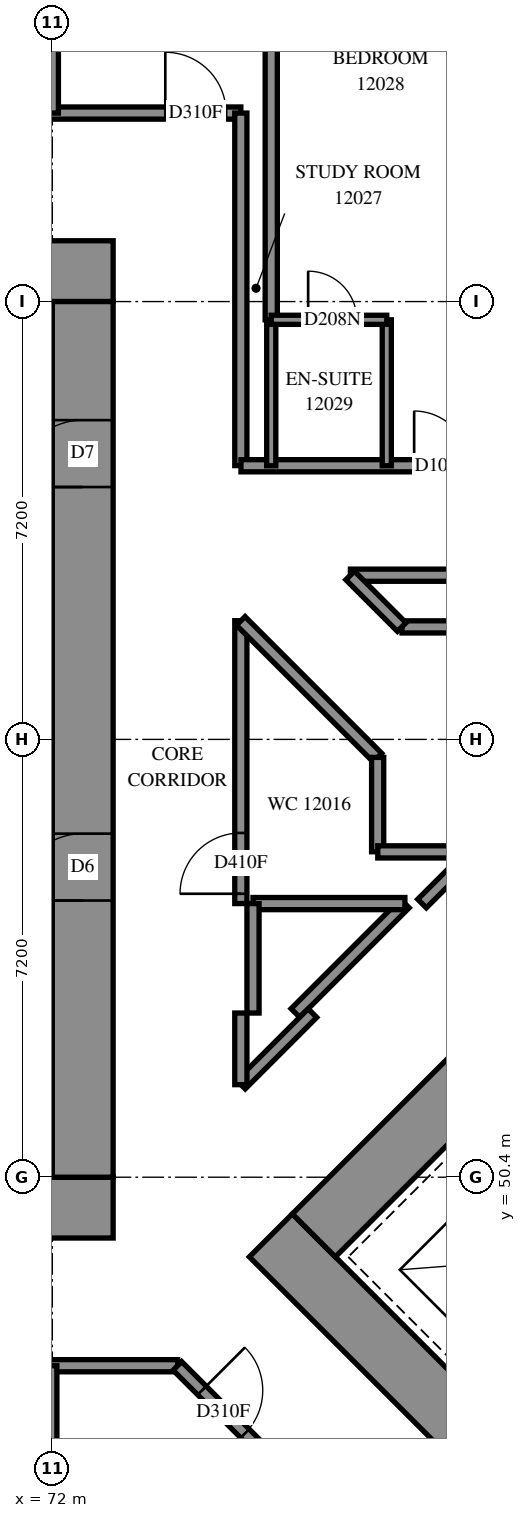
"""IFC4 building model, lengths in metres.
Left out: names, types, materials, properties, quantities, classifications, styles, units other than length and angle.
Written with IfcOpenShell. Run it as: python <this file> out.ifc"""

import sys

from ifc_helpers import new_model, si_unit, direction, frame, frame_2d, origin, place, context, subcontext, project, spatial, rectangle, extrude, element, fill, save


model = new_model("IFC4")
c1 = context("Model", 3, precision=1e-05, world=origin(), true_north=direction((0.0, 1.0)))
c2 = subcontext(c1, "Body", "Model", "MODEL_VIEW")
j1 = project(units=[si_unit("LENGTHUNIT", "METRE"), si_unit("PLANEANGLEUNIT", "RADIAN")], contexts=[c1])
p1 = place(None, origin())
s1 = spatial("IfcSite", under=j1, at=p1, CompositionType="ELEMENT")
p2 = place(p1, origin())
s2 = spatial("IfcBuilding", under=s1, at=p2, CompositionType="ELEMENT")
p3 = place(p2, frame((0.0, 0.0, 47.4)))
s3 = spatial("IfcBuildingStorey", under=s2, at=p3, CompositionType="ELEMENT", Elevation=47.4)
p4 = place(p3, frame((56.6, 49.9, -0.3), z_axis=(0.0, 0.0, 1.0), x_axis=(1.0, 0.0, 0.0)))
e1 = element("IfcWall", 1, at=p4, inside=s3, PredefinedType="SHEAR", context=c2, shape_type="SweptSolid", body=[
    extrude(rectangle(XDim=16.4, YDim=1.0, at=frame_2d((8.2, 0.0))), origin(), (0.0, 0.0, 1.0), 2.7),
])
p5 = place(p3, frame((56.6, 65.3, -0.3), z_axis=(0.0, 0.0, 1.0), x_axis=(1.0, 0.0, 0.0)))
e2 = element("IfcWall", 2, at=p5, inside=s3, PredefinedType="SHEAR", context=c2, shape_type="SweptSolid", body=[
    extrude(rectangle(XDim=16.4, YDim=1.0, at=frame_2d((8.2, 0.0))), origin(), (0.0, 0.0, 1.0), 2.7),
])
p6 = place(p5, frame((11.0, 0.0, 0.3)))
e3 = element("IfcOpeningElement", 3, at=p6, cuts=e2, PredefinedType="OPENING", context=c2, shape_type="SweptSolid", body=[
    extrude(rectangle(XDim=0.8, YDim=2.1, at=frame_2d((0.4, 1.05))), frame((0.0, 0.51, 0.0), z_axis=(0.0, -1.0, 0.0), x_axis=(1.0, 0.0, 0.0)), (0.0, 0.0, 1.0), 1.02),
])
p7 = place(p3, frame((72.5, 50.4, -0.3), z_axis=(0.0, 0.0, 1.0), x_axis=(0.0, 1.0, 0.0)))
e4 = element("IfcWall", 4, at=p7, inside=s3, PredefinedType="SHEAR", context=c2, shape_type="SweptSolid", body=[
    extrude(rectangle(XDim=14.4, YDim=1.0, at=frame_2d((7.2, 0.0))), origin(), (0.0, 0.0, 1.0), 2.7),
])
p8 = place(p7, frame((4.55, 0.0, 0.3)))
e5 = element("IfcOpeningElement", 5, at=p8, cuts=e4, PredefinedType="OPENING", context=c2, shape_type="SweptSolid", body=[
    extrude(rectangle(XDim=1.1, YDim=2.1, at=frame_2d((0.55, 1.05))), frame((0.0, 0.51, 0.0), z_axis=(0.0, -1.0, 0.0), x_axis=(1.0, 0.0, 0.0)), (0.0, 0.0, 1.0), 1.02),
])
p9 = place(p7, frame((11.35, 0.0, 0.3)))
e6 = element("IfcOpeningElement", 6, at=p9, cuts=e4, PredefinedType="OPENING", context=c2, shape_type="SweptSolid", body=[
    extrude(rectangle(XDim=1.1, YDim=2.1, at=frame_2d((0.55, 1.05))), frame((0.0, 0.51, 0.0), z_axis=(0.0, -1.0, 0.0), x_axis=(1.0, 0.0, 0.0)), (0.0, 0.0, 1.0), 1.02),
])
p10 = place(p3, frame((75.594, 49.443, -0.3), z_axis=(0.0, 0.0, 1.0), x_axis=(0.7071037324, -0.70710983, 0.0)))
e7 = element("IfcWall", 7, at=p10, inside=s3, PredefinedType="SHEAR", context=c2, shape_type="SweptSolid", body=[
    extrude(rectangle(XDim=16.4, YDim=1.0, at=frame_2d((8.2, 0.0))), origin(), (0.0, 0.0, 1.0), 2.7),
])
p11 = place(p3, frame((76.301, 49.443, -0.3), z_axis=(0.0, 0.0, 1.0), x_axis=(0.7071067812, 0.7071067812, 0.0)))
e8 = element("IfcWall", 8, at=p11, inside=s3, PredefinedType="SHEAR", context=c2, shape_type="SweptSolid", body=[
    extrude(rectangle(XDim=14.4, YDim=1.0, at=frame_2d((7.2, 0.0))), origin(), (0.0, 0.0, 1.0), 2.7),
])
p12 = place(p11, frame((4.55, 0.0, 0.3)))
e9 = element("IfcOpeningElement", 9, at=p12, cuts=e8, PredefinedType="OPENING", context=c2, shape_type="SweptSolid", body=[
    extrude(rectangle(XDim=1.1, YDim=2.1, at=frame_2d((0.55, 1.05))), frame((0.0, 0.51, 0.0), z_axis=(0.0, -1.0, 0.0), x_axis=(1.0, 0.0, 0.0)), (0.0, 0.0, 1.0), 1.02),
])
p13 = place(p11, frame((11.35, 0.0, 0.3)))
e10 = element("IfcOpeningElement", 10, at=p13, cuts=e8, PredefinedType="OPENING", context=c2, shape_type="SweptSolid", body=[
    extrude(rectangle(XDim=1.1, YDim=2.1, at=frame_2d((0.55, 1.05))), frame((0.0, 0.51, 0.0), z_axis=(0.0, -1.0, 0.0), x_axis=(1.0, 0.0, 0.0)), (0.0, 0.0, 1.0), 1.02),
])
p14 = place(p3, frame((54.5, 67.9, 0.0), z_axis=(0.0, 0.0, 1.0), x_axis=(1.0, 0.0, 0.0)))
e11 = element("IfcWall", 11, at=p14, inside=s3, PredefinedType="PARTITIONING", context=c2, shape_type="SweptSolid", body=[
    extrude(rectangle(XDim=20.6, YDim=0.2, at=frame_2d((10.3, 0.0))), origin(), (0.0, 0.0, 1.0), 3.1),
])
p15 = place(p14, frame((0.198, 0.0, 0.0)))
e12 = element("IfcOpeningElement", 12, at=p15, cuts=e11, PredefinedType="OPENING", context=c2, shape_type="SweptSolid", body=[
    extrude(rectangle(XDim=1.0, YDim=2.1, at=frame_2d((0.5, 1.05))), frame((0.0, 0.11, 0.0), z_axis=(0.0, -1.0, 0.0), x_axis=(1.0, 0.0, 0.0)), (0.0, 0.0, 1.0), 0.22),
])
p16 = place(p14, frame((19.358, 0.0, 0.0)))
e13 = element("IfcOpeningElement", 13, at=p16, cuts=e11, PredefinedType="OPENING", context=c2, shape_type="SweptSolid", body=[
    extrude(rectangle(XDim=1.0, YDim=2.1, at=frame_2d((0.5, 1.05))), frame((0.0, 0.11, 0.0), z_axis=(0.0, -1.0, 0.0), x_axis=(1.0, 0.0, 0.0)), (0.0, 0.0, 1.0), 0.22),
])
p17 = place(p14, frame((6.698, 0.0, 0.0)))
e14 = element("IfcOpeningElement", 14, at=p17, cuts=e11, PredefinedType="OPENING", context=c2, shape_type="SweptSolid", body=[
    extrude(rectangle(XDim=0.9, YDim=2.1, at=frame_2d((0.45, 1.05))), frame((0.0, 0.11, 0.0), z_axis=(0.0, -1.0, 0.0), x_axis=(1.0, 0.0, 0.0)), (0.0, 0.0, 1.0), 0.22),
])
p18 = place(p14, frame((13.884, 0.0, 0.0)))
e15 = element("IfcOpeningElement", 15, at=p18, cuts=e11, PredefinedType="OPENING", context=c2, shape_type="SweptSolid", body=[
    extrude(rectangle(XDim=1.0, YDim=2.1, at=frame_2d((0.5, 1.05))), frame((0.0, 0.11, 0.0), z_axis=(0.0, -1.0, 0.0), x_axis=(1.0, 0.0, 0.0)), (0.0, 0.0, 1.0), 0.22),
])
p19 = place(p3, frame((54.5, 47.3, 0.0), z_axis=(0.0, 0.0, 1.0), x_axis=(1.0, 0.0, 0.0)))
e16 = element("IfcWall", 16, at=p19, inside=s3, PredefinedType="PARTITIONING", context=c2, shape_type="SweptSolid", body=[
    extrude(rectangle(XDim=19.56, YDim=0.2, at=frame_2d((9.78, 0.0))), origin(), (0.0, 0.0, 1.0), 3.1),
])
p20 = place(p19, frame((0.23, 0.0, 0.0)))
e17 = element("IfcOpeningElement", 17, at=p20, cuts=e16, PredefinedType="OPENING", context=c2, shape_type="SweptSolid", body=[
    extrude(rectangle(XDim=1.0, YDim=2.1, at=frame_2d((0.5, 1.05))), frame((0.0, 0.11, 0.0), z_axis=(0.0, -1.0, 0.0), x_axis=(1.0, 0.0, 0.0)), (0.0, 0.0, 1.0), 0.22),
])
p21 = place(p19, frame((5.4, 0.0, 0.0)))
e18 = element("IfcOpeningElement", 18, at=p21, cuts=e16, PredefinedType="OPENING", context=c2, shape_type="SweptSolid", body=[
    extrude(rectangle(XDim=0.9, YDim=2.1, at=frame_2d((0.45, 1.05))), frame((0.0, 0.11, 0.0), z_axis=(0.0, -1.0, 0.0), x_axis=(1.0, 0.0, 0.0)), (0.0, 0.0, 1.0), 0.22),
])
p22 = place(p19, frame((9.001, 0.0, 0.0)))
e19 = element("IfcOpeningElement", 19, at=p22, cuts=e16, PredefinedType="OPENING", context=c2, shape_type="SweptSolid", body=[
    extrude(rectangle(XDim=0.9, YDim=2.1, at=frame_2d((0.45, 1.05))), frame((0.0, 0.11, 0.0), z_axis=(0.0, -1.0, 0.0), x_axis=(1.0, 0.0, 0.0)), (0.0, 0.0, 1.0), 0.22),
])
p23 = place(p19, frame((14.3, 0.0, 0.0)))
e20 = element("IfcOpeningElement", 20, at=p23, cuts=e16, PredefinedType="OPENING", context=c2, shape_type="SweptSolid", body=[
    extrude(rectangle(XDim=0.9, YDim=2.1, at=frame_2d((0.45, 1.05))), frame((0.0, 0.11, 0.0), z_axis=(0.0, -1.0, 0.0), x_axis=(1.0, 0.0, 0.0)), (0.0, 0.0, 1.0), 0.22),
])
p24 = place(p3, frame((75.6, 64.5, 0.0), z_axis=(0.0, 0.0, 1.0), x_axis=(0.0, 1.0, 0.0)))
e21 = element("IfcWall", 21, at=p24, inside=s3, PredefinedType="PARTITIONING", context=c2, shape_type="SweptSolid", body=[
    extrude(rectangle(XDim=8.24, YDim=0.2, at=frame_2d((4.12, 0.0))), origin(), (0.0, 0.0, 1.0), 3.1),
])
p25 = place(p3, frame((75.1, 62.102, 0.0), z_axis=(0.0, 0.0, 1.0), x_axis=(0.0, 1.0, 0.0)))
e22 = element("IfcWall", 22, at=p25, inside=s3, PredefinedType="PARTITIONING", context=c2, shape_type="SweptSolid", body=[
    extrude(rectangle(XDim=5.798, YDim=0.2, at=frame_2d((2.899, 0.0))), origin(), (0.0, 0.0, 1.0), 3.1),
])
p26 = place(p3, frame((74.057, 47.297, 0.0), z_axis=(0.0, 0.0, 1.0), x_axis=(0.7071067812, -0.7071067812, 0.0)))
e23 = element("IfcWall", 23, at=p26, inside=s3, PredefinedType="PARTITIONING", context=c2, shape_type="SweptSolid", body=[
    extrude(rectangle(XDim=4.653, YDim=0.2, at=frame_2d((2.326, 0.0))), origin(), (0.0, 0.0, 1.0), 3.1),
])
p27 = place(p26, frame((0.57, 0.0, 0.0)))
e24 = element("IfcOpeningElement", 24, at=p27, cuts=e23, PredefinedType="OPENING", context=c2, shape_type="SweptSolid", body=[
    extrude(rectangle(XDim=1.0, YDim=2.1, at=frame_2d((0.5, 1.05))), frame((0.0, 0.11, 0.0), z_axis=(0.0, -1.0, 0.0), x_axis=(1.0, 0.0, 0.0)), (0.0, 0.0, 1.0), 0.22),
])
p28 = place(p3, frame((75.1, 54.9, 0.0), z_axis=(0.0, 0.0, 1.0), x_axis=(0.0, 1.0, 0.0)))
e25 = element("IfcWall", 25, at=p28, inside=s3, PredefinedType="PARTITIONING", context=c2, shape_type="SweptSolid", body=[
    extrude(rectangle(XDim=4.652, YDim=0.2, at=frame_2d((2.326, 0.0))), origin(), (0.0, 0.0, 1.0), 3.1),
])
p29 = place(p28, frame((0.161, 0.0, 0.0)))
e26 = element("IfcOpeningElement", 26, at=p29, cuts=e25, PredefinedType="OPENING", context=c2, shape_type="SweptSolid", body=[
    extrude(rectangle(XDim=1.0, YDim=2.1, at=frame_2d((0.5, 1.05))), frame((0.0, 0.11, 0.0), z_axis=(0.0, -1.0, 0.0), x_axis=(1.0, 0.0, 0.0)), (0.0, 0.0, 1.0), 0.22),
])
p30 = place(p3, frame((75.102, 62.1, 0.0), z_axis=(0.0, 0.0, 1.0), x_axis=(1.0, 0.0, 0.0)))
e27 = element("IfcWall", 27, at=p30, inside=s3, PredefinedType="PARTITIONING", context=c2, shape_type="SweptSolid", body=[
    extrude(rectangle(XDim=4.098, YDim=0.2, at=frame_2d((2.049, 0.0))), origin(), (0.0, 0.0, 1.0), 3.1),
])
p31 = place(p30, frame((2.848, 0.0, 0.0)))
e28 = element("IfcOpeningElement", 28, at=p31, cuts=e27, PredefinedType="OPENING", context=c2, shape_type="SweptSolid", body=[
    extrude(rectangle(XDim=0.9, YDim=2.1, at=frame_2d((0.45, 1.05))), frame((0.0, 0.11, 0.0), z_axis=(0.0, -1.0, 0.0), x_axis=(1.0, 0.0, 0.0)), (0.0, 0.0, 1.0), 0.22),
])
p32 = place(p3, frame((72.0, 67.9, 0.0), z_axis=(0.0, 0.0, 1.0), x_axis=(0.0, 1.0, 0.0)))
e29 = element("IfcWall", 29, at=p32, inside=s3, PredefinedType="PARTITIONING", context=c2, shape_type="SweptSolid", body=[
    extrude(rectangle(XDim=3.5, YDim=0.2, at=frame_2d((1.75, 0.0))), origin(), (0.0, 0.0, 1.0), 3.1),
])
p33 = place(p3, frame((75.099, 59.549, 0.0), z_axis=(0.0, 0.0, 1.0), x_axis=(0.7071067812, -0.7071067812, 0.0)))
e30 = element("IfcWall", 30, at=p33, inside=s3, PredefinedType="PARTITIONING", context=c2, shape_type="SweptSolid", body=[
    extrude(rectangle(XDim=3.179, YDim=0.2, at=frame_2d((1.59, 0.0))), origin(), (0.0, 0.0, 1.0), 3.1),
])
p34 = place(p3, frame((75.997, 53.101, 0.0), z_axis=(0.0, 0.0, 1.0), x_axis=(0.7071067812, 0.7071067812, 0.0)))
e31 = element("IfcWall", 31, at=p34, inside=s3, PredefinedType="PARTITIONING", context=c2, shape_type="SweptSolid", body=[
    extrude(rectangle(XDim=2.546, YDim=0.2, at=frame_2d((1.273, 0.0))), origin(), (0.0, 0.0, 1.0), 3.1),
])
p35 = place(p3, frame((75.3, 54.9, 0.0), z_axis=(0.0, 0.0, 1.0), x_axis=(1.0, 0.0, 0.0)))
e32 = element("IfcWall", 32, at=p35, inside=s3, PredefinedType="PARTITIONING", context=c2, shape_type="SweptSolid", body=[
    extrude(rectangle(XDim=2.498, YDim=0.2, at=frame_2d((1.249, 0.0))), origin(), (0.0, 0.0, 1.0), 3.1),
])
for number, where, z_axis, x_axis in (
    (33, (72.0, 44.9, 0.0), (0.0, 0.0, 1.0), (0.0, 1.0, 0.0)),
    (34, (75.6, 62.1, 0.0), (0.0, 0.0, 1.0), (0.0, 1.0, 0.0)),
    (35, (77.5, 62.1, 0.0), (0.0, 0.0, 1.0), (0.0, 1.0, 0.0)),
):
    element("IfcWall", number, at=place(p3, frame(where, z_axis=z_axis, x_axis=x_axis)), inside=s3, PredefinedType="PARTITIONING", context=c2, shape_type="SweptSolid", body=[
        extrude(rectangle(XDim=2.4, YDim=0.15, at=frame_2d((1.2, 0.0))), origin(), (0.0, 0.0, 1.0), 3.1),
    ])
p36 = place(p3, frame((76.902, 60.3, 0.0), z_axis=(0.0, 0.0, 1.0), x_axis=(1.0, 0.0, 0.0)))
e36 = element("IfcWall", 36, at=p36, inside=s3, PredefinedType="PARTITIONING", context=c2, shape_type="SweptSolid", body=[
    extrude(rectangle(XDim=2.298, YDim=0.2, at=frame_2d((1.149, 0.0))), origin(), (0.0, 0.0, 1.0), 3.1),
])
p37 = place(p3, frame((77.75, 59.45, 0.0), z_axis=(0.0, 0.0, 1.0), x_axis=(1.0, 0.0, 0.0)))
e37 = element("IfcWall", 37, at=p37, inside=s3, PredefinedType="PARTITIONING", context=c2, shape_type="SweptSolid", body=[
    extrude(rectangle(XDim=2.05, YDim=0.2, at=frame_2d((1.025, 0.0))), origin(), (0.0, 0.0, 1.0), 3.1),
])
p38 = place(p3, frame((75.6, 64.5, 0.0), z_axis=(0.0, 0.0, 1.0), x_axis=(1.0, 0.0, 0.0)))
e38 = element("IfcWall", 38, at=p38, inside=s3, PredefinedType="PARTITIONING", context=c2, shape_type="SweptSolid", body=[
    extrude(rectangle(XDim=1.9, YDim=0.15, at=frame_2d((0.95, 0.0))), origin(), (0.0, 0.0, 1.0), 3.1),
])
p39 = place(p38, frame((0.607, 0.0, 0.0)))
e39 = element("IfcOpeningElement", 39, at=p39, cuts=e38, PredefinedType="OPENING", context=c2, shape_type="SweptSolid", body=[
    extrude(rectangle(XDim=0.8, YDim=2.1, at=frame_2d((0.4, 1.05))), frame((0.0, 0.085, 0.0), z_axis=(0.0, -1.0, 0.0), x_axis=(1.0, 0.0, 0.0)), (0.0, 0.0, 1.0), 0.17),
])
p40 = place(p3, frame((75.3, 53.1, 0.0), z_axis=(0.0, 0.0, 1.0), x_axis=(0.0, 1.0, 0.0)))
e40 = element("IfcWall", 40, at=p40, inside=s3, PredefinedType="PARTITIONING", context=c2, shape_type="SweptSolid", body=[
    extrude(rectangle(XDim=1.8, YDim=0.2, at=frame_2d((0.9, 0.0))), origin(), (0.0, 0.0, 1.0), 3.1),
])
p41 = place(p3, frame((75.102, 51.922, 0.0), z_axis=(0.0, 0.0, 1.0), x_axis=(0.7071067812, 0.7071067812, 0.0)))
e41 = element("IfcWall", 41, at=p41, inside=s3, PredefinedType="PARTITIONING", context=c2, shape_type="SweptSolid", body=[
    extrude(rectangle(XDim=1.663, YDim=0.2, at=frame_2d((0.832, 0.0))), origin(), (0.0, 0.0, 1.0), 3.1),
])
for number, where, z_axis, x_axis in (
    (42, (77.35, 55.752, 0.0), (0.0, 0.0, 1.0), (0.0, 1.0, 0.0)),
    (43, (77.352, 55.75, 0.0), (0.0, 0.0, 1.0), (1.0, 0.0, 0.0)),
):
    element("IfcWall", number, at=place(p3, frame(where, z_axis=z_axis, x_axis=x_axis)), inside=s3, PredefinedType="PARTITIONING", context=c2, shape_type="SweptSolid", body=[
        extrude(rectangle(XDim=1.552, YDim=0.2, at=frame_2d((0.776, 0.0))), origin(), (0.0, 0.0, 1.0), 3.1),
    ])
p42 = place(p3, frame((76.897, 60.295, 0.0), z_axis=(0.0, 0.0, 1.0), x_axis=(0.7071067812, -0.7071067812, 0.0)))
e44 = element("IfcWall", 44, at=p42, inside=s3, PredefinedType="PARTITIONING", context=c2, shape_type="SweptSolid", body=[
    extrude(rectangle(XDim=1.199, YDim=0.2, at=frame_2d((0.6, 0.0))), origin(), (0.0, 0.0, 1.0), 3.1),
])
p43 = place(p3, frame((78.079, 54.901, 0.0), z_axis=(0.0, 0.0, 1.0), x_axis=(0.7071067812, 0.7071067812, 0.0)))
e45 = element("IfcWall", 45, at=p43, inside=s3, PredefinedType="PARTITIONING", context=c2, shape_type="SweptSolid", body=[
    extrude(rectangle(XDim=1.182, YDim=0.2, at=frame_2d((0.591, 0.0))), origin(), (0.0, 0.0, 1.0), 3.1),
])
p44 = place(p3, frame((75.1, 51.922, 0.0), z_axis=(0.0, 0.0, 1.0), x_axis=(0.0, 1.0, 0.0)))
e46 = element("IfcWall", 46, at=p44, inside=s3, PredefinedType="PARTITIONING", context=c2, shape_type="SweptSolid", body=[
    extrude(rectangle(XDim=1.178, YDim=0.2, at=frame_2d((0.589, 0.0))), origin(), (0.0, 0.0, 1.0), 3.1),
])
p45 = place(p8, origin())
e47 = element("IfcDoor", 47, at=p45, inside=s3, OperationType="DOUBLE_DOOR_SINGLE_SWING", PredefinedType="DOOR", context=c2, shape_type="SweptSolid", body=[
    extrude(rectangle(XDim=1.1, YDim=2.1, at=frame_2d((0.55, 1.05))), frame((0.0, 0.025, 0.0), z_axis=(0.0, -1.0, 0.0), x_axis=(1.0, 0.0, 0.0)), (0.0, 0.0, 1.0), 0.05),
])
fill(e5, e47)
p46 = place(p9, origin())
e48 = element("IfcDoor", 48, at=p46, inside=s3, OperationType="SINGLE_SWING_RIGHT", PredefinedType="DOOR", context=c2, shape_type="SweptSolid", body=[
    extrude(rectangle(XDim=1.1, YDim=2.1, at=frame_2d((0.55, 1.05))), frame((0.0, 0.025, 0.0), z_axis=(0.0, -1.0, 0.0), x_axis=(1.0, 0.0, 0.0)), (0.0, 0.0, 1.0), 0.05),
])
fill(e6, e48)
p47 = place(p29, origin())
e49 = element("IfcDoor", 49, at=p47, inside=s3, OperationType="SINGLE_SWING_LEFT", PredefinedType="DOOR", context=c2, shape_type="SweptSolid", body=[
    extrude(rectangle(XDim=1.0, YDim=2.1, at=frame_2d((0.5, 1.05))), frame((0.0, 0.025, 0.0), z_axis=(0.0, -1.0, 0.0), x_axis=(1.0, 0.0, 0.0)), (0.0, 0.0, 1.0), 0.05),
])
fill(e26, e49)
p48 = place(p16, origin())
e50 = element("IfcDoor", 50, at=p48, inside=s3, OperationType="SINGLE_SWING_RIGHT", PredefinedType="DOOR", context=c2, shape_type="SweptSolid", body=[
    extrude(rectangle(XDim=1.0, YDim=2.1, at=frame_2d((0.5, 1.05))), frame((0.0, 0.025, 0.0), z_axis=(0.0, -1.0, 0.0), x_axis=(1.0, 0.0, 0.0)), (0.0, 0.0, 1.0), 0.05),
])
fill(e13, e50)
p49 = place(p31, origin())
e51 = element("IfcDoor", 51, at=p49, inside=s3, OperationType="SINGLE_SWING_LEFT", PredefinedType="DOOR", context=c2, shape_type="SweptSolid", body=[
    extrude(rectangle(XDim=0.9, YDim=2.1, at=frame_2d((0.45, 1.05))), frame((0.0, 0.025, 0.0), z_axis=(0.0, -1.0, 0.0), x_axis=(1.0, 0.0, 0.0)), (0.0, 0.0, 1.0), 0.05),
])
fill(e28, e51)
p50 = place(p39, origin())
e52 = element("IfcDoor", 52, at=p50, inside=s3, OperationType="SINGLE_SWING_RIGHT", PredefinedType="DOOR", context=c2, shape_type="SweptSolid", body=[
    extrude(rectangle(XDim=0.8, YDim=2.1, at=frame_2d((0.4, 1.05))), frame((0.0, 0.025, 0.0), z_axis=(0.0, -1.0, 0.0), x_axis=(1.0, 0.0, 0.0)), (0.0, 0.0, 1.0), 0.05),
])
fill(e39, e52)
p51 = place(p27, origin())
e53 = element("IfcDoor", 53, at=p51, inside=s3, OperationType="SINGLE_SWING_LEFT", PredefinedType="DOOR", context=c2, shape_type="SweptSolid", body=[
    extrude(rectangle(XDim=1.0, YDim=2.1, at=frame_2d((0.5, 1.05))), frame((0.0, 0.025, 0.0), z_axis=(0.0, -1.0, 0.0), x_axis=(1.0, 0.0, 0.0)), (0.0, 0.0, 1.0), 0.05),
])
fill(e24, e53)
save(model, sys.argv[1])
